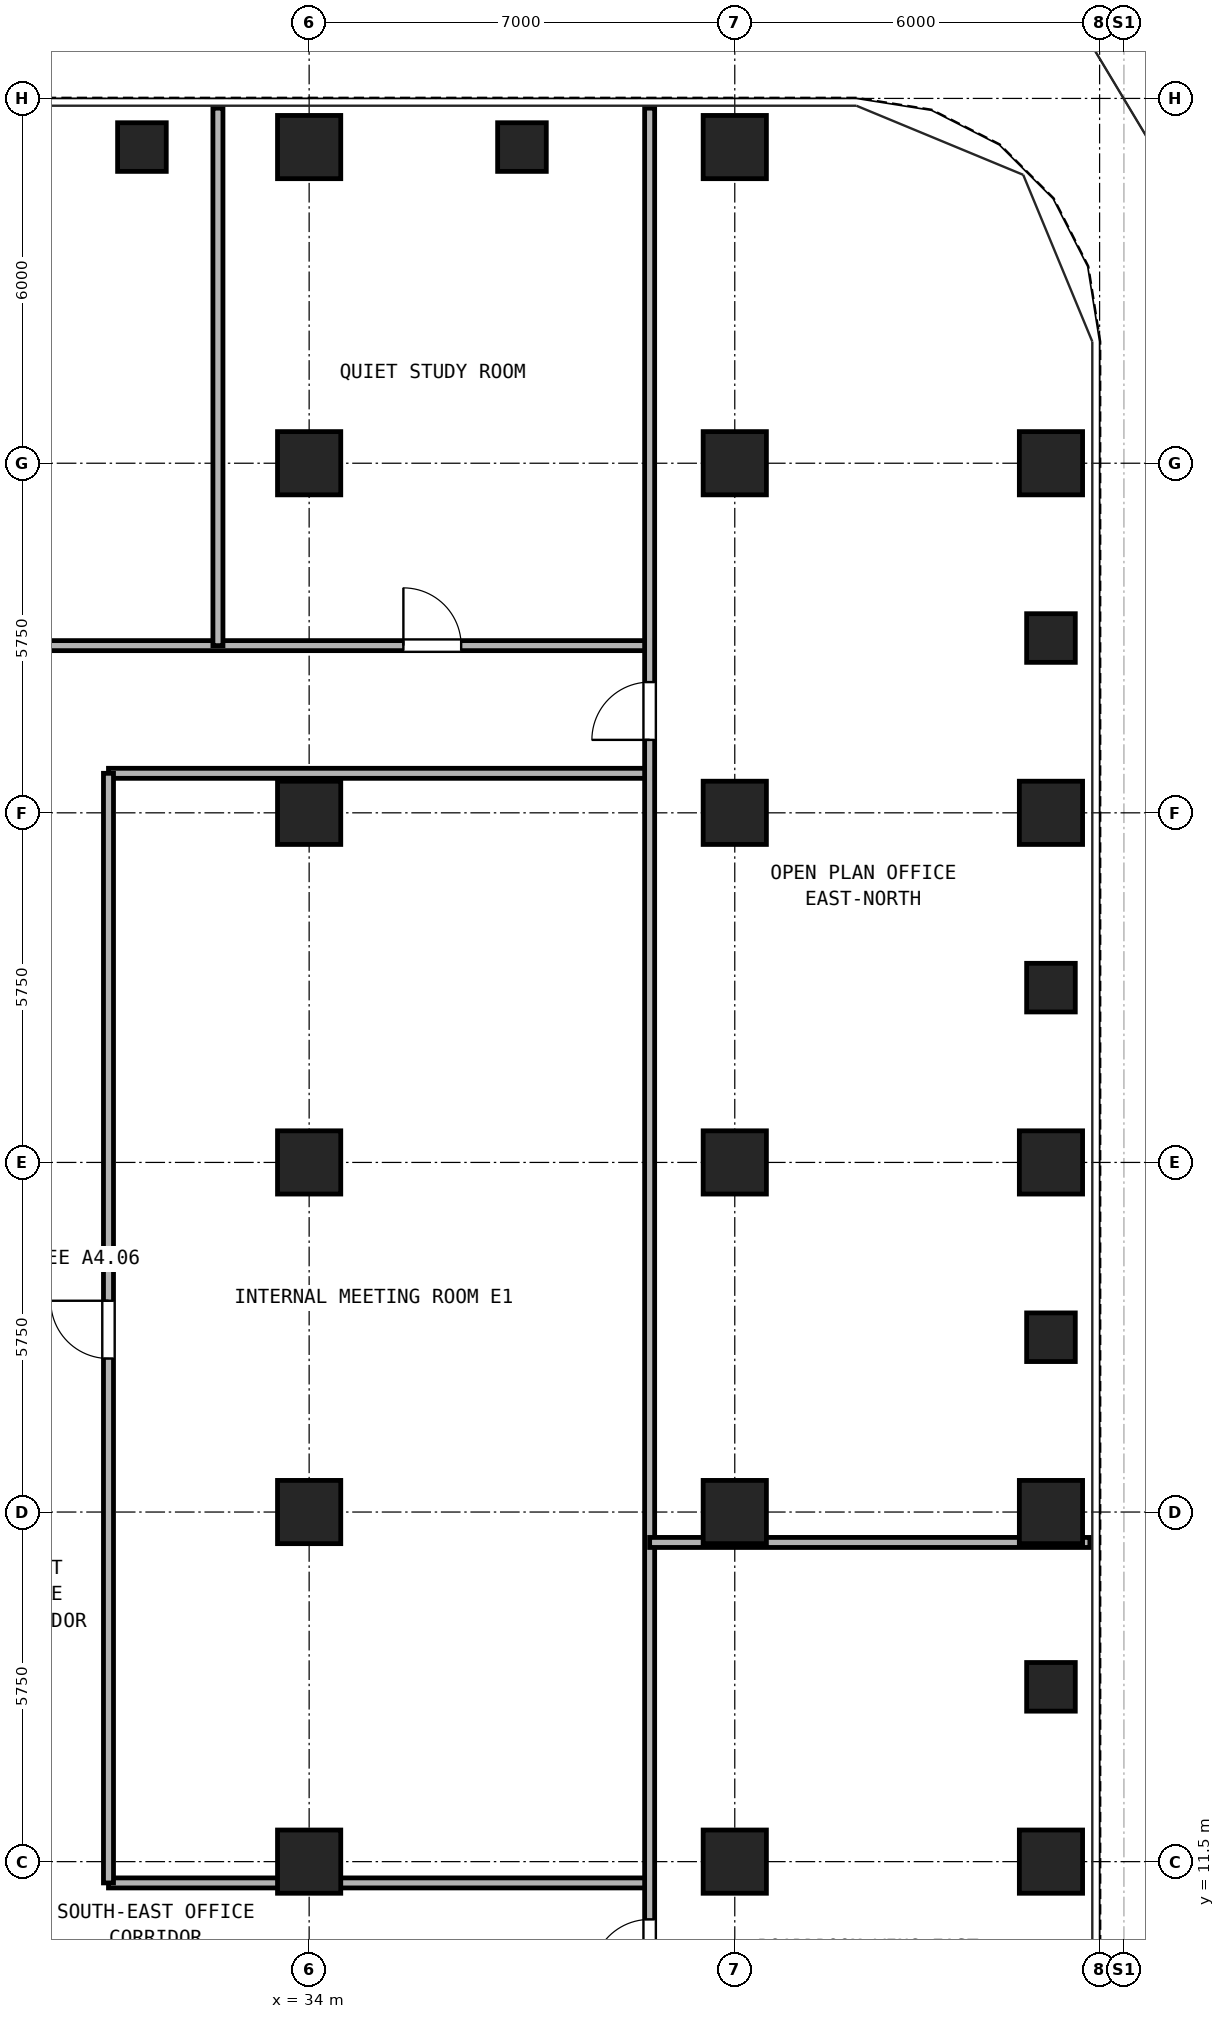
"""IFC4 building model, lengths in metres.
Left out: names, types, materials, properties, quantities, classifications, styles, units other than length and angle.
Written with IfcOpenShell. Run it as: python <this file> out.ifc"""

import sys

from ifc_helpers import new_model, si_unit, direction, frame, frame_2d, origin, origin_2d, place, context, subcontext, project, spatial, rectangle, hollow_rectangle, extrude, source, transform, mapped, element, fill, save


model = new_model("IFC4")
c1 = context("Model", 3, precision=1e-05, world=origin(), true_north=direction((0.0, 1.0)))
c2 = subcontext(c1, "Body", "Model", "MODEL_VIEW")
j1 = project(units=[si_unit("LENGTHUNIT", "METRE"), si_unit("PLANEANGLEUNIT", "RADIAN")], contexts=[c1])
p1 = place(None, origin())
s1 = spatial("IfcSite", under=j1, at=p1, CompositionType="ELEMENT")
p2 = place(p1, origin())
s2 = spatial("IfcBuilding", under=s1, at=p2, CompositionType="ELEMENT")
p3 = place(p2, frame((0.0, 0.0, 36.9)))
s3 = spatial("IfcBuildingStorey", under=s2, at=p3, CompositionType="ELEMENT", Elevation=36.9)
m1 = source(origin(), c2, "Body", "SweptSolid", [
    extrude(hollow_rectangle(XDim=1.04, YDim=1.04, WallThickness=0.065, at=origin_2d()), origin(), (0.0, 0.0, 1.0), 3.32),
])
for number, where, z_axis, x_axis in (
    (1, (34.0, 39.7, 0.0), (0.0, 0.0, 1.0), (1.0, 0.0, 0.0)),
    (2, (41.0, 39.7, 0.0), (0.0, 0.0, 1.0), (1.0, 0.0, 0.0)),
    (3, (46.2, 11.5, 0.0), (0.0, 0.0, 1.0), (1.0, 0.0, 0.0)),
    (4, (46.2, 17.25, 0.0), (0.0, 0.0, 1.0), (1.0, 0.0, 0.0)),
    (5, (46.2, 23.0, 0.0), (0.0, 0.0, 1.0), (1.0, 0.0, 0.0)),
    (6, (46.2, 28.75, 0.0), (0.0, 0.0, 1.0), (1.0, 0.0, 0.0)),
    (7, (46.2, 34.5, 0.0), (0.0, 0.0, 1.0), (1.0, 0.0, 0.0)),
    (8, (34.0, 11.5, 0.0), (0.0, 0.0, 1.0), (1.0, 0.0, 0.0)),
    (9, (34.0, 17.25, 0.0), (0.0, 0.0, 1.0), (1.0, 0.0, 0.0)),
    (10, (34.0, 23.0, 0.0), (0.0, 0.0, 1.0), (1.0, 0.0, 0.0)),
    (11, (34.0, 28.75, 0.0), (0.0, 0.0, 1.0), (1.0, 0.0, 0.0)),
    (12, (34.0, 34.5, 0.0), (0.0, 0.0, 1.0), (1.0, 0.0, 0.0)),
    (13, (41.0, 11.5, 0.0), (0.0, 0.0, 1.0), (1.0, 0.0, 0.0)),
    (14, (41.0, 17.25, 0.0), (0.0, 0.0, 1.0), (1.0, 0.0, 0.0)),
    (15, (41.0, 23.0, 0.0), (0.0, 0.0, 1.0), (1.0, 0.0, 0.0)),
    (16, (41.0, 28.75, 0.0), (0.0, 0.0, 1.0), (1.0, 0.0, 0.0)),
    (17, (41.0, 34.5, 0.0), (0.0, 0.0, 1.0), (1.0, 0.0, 0.0)),
):
    element("IfcColumn", number, at=place(p3, frame(where, z_axis=z_axis, x_axis=x_axis)), inside=s3, PredefinedType="COLUMN", context=c2, shape_type="MappedRepresentation", body=[
        mapped(m1, transform((0.0, 0.0, 0.0), x_axis=(1.0, 0.0, 0.0), y_axis=(0.0, 1.0, 0.0), z_axis=(0.0, 0.0, 1.0), scale=1.0)),
    ])
m2 = source(origin(), c2, "Body", "SweptSolid", [
    extrude(hollow_rectangle(XDim=0.8, YDim=0.8, WallThickness=0.045, at=origin_2d()), origin(), (0.0, 0.0, 1.0), 3.32),
])
for number, where, z_axis, x_axis in (
    (18, (31.25, 39.7, 0.0), (0.0, 0.0, 1.0), (1.0, 0.0, 0.0)),
    (19, (37.5, 39.7, 0.0), (0.0, 0.0, 1.0), (1.0, 0.0, 0.0)),
    (20, (46.2, 14.375, 0.0), (0.0, 0.0, 1.0), (1.0, 0.0, 0.0)),
    (21, (46.2, 20.125, 0.0), (0.0, 0.0, 1.0), (1.0, 0.0, 0.0)),
    (22, (46.2, 25.875, 0.0), (0.0, 0.0, 1.0), (1.0, 0.0, 0.0)),
    (23, (46.2, 31.625, 0.0), (0.0, 0.0, 1.0), (1.0, 0.0, 0.0)),
):
    element("IfcColumn", number, at=place(p3, frame(where, z_axis=z_axis, x_axis=x_axis)), inside=s3, PredefinedType="COLUMN", context=c2, shape_type="MappedRepresentation", body=[
        mapped(m2, transform((0.0, 0.0, 0.0), x_axis=(1.0, 0.0, 0.0), y_axis=(0.0, 1.0, 0.0), z_axis=(0.0, 0.0, 1.0), scale=1.0)),
    ])
p4 = place(p3, frame((7.4, 31.5, 0.0), z_axis=(0.0, 0.0, 1.0), x_axis=(1.0, 0.0, 0.0)))
e24 = element("IfcWall", 24, at=p4, inside=s3, PredefinedType="PARTITIONING", context=c2, shape_type="SweptSolid", body=[
    extrude(rectangle(XDim=32.2, YDim=0.165, at=frame_2d((16.1, 0.0))), origin(), (0.0, 0.0, 1.0), 2.898),
])
p5 = place(p4, frame((7.55, 0.0, 0.0)))
e25 = element("IfcOpeningElement", 25, at=p5, cuts=e24, PredefinedType="OPENING", context=c2, shape_type="SweptSolid", body=[
    extrude(rectangle(XDim=0.95, YDim=2.15, at=frame_2d((0.475, 1.075))), frame((0.0, 0.093, 0.0), z_axis=(0.0, -1.0, 0.0), x_axis=(1.0, 0.0, 0.0)), (0.0, 0.0, 1.0), 0.185),
])
p6 = place(p4, frame((20.1, 0.0, 0.0)))
e26 = element("IfcOpeningElement", 26, at=p6, cuts=e24, PredefinedType="OPENING", context=c2, shape_type="SweptSolid", body=[
    extrude(rectangle(XDim=0.95, YDim=2.15, at=frame_2d((0.475, 1.075))), frame((0.0, 0.093, 0.0), z_axis=(0.0, -1.0, 0.0), x_axis=(1.0, 0.0, 0.0)), (0.0, 0.0, 1.0), 0.185),
])
p7 = place(p4, frame((28.15, 0.0, 0.0)))
e27 = element("IfcOpeningElement", 27, at=p7, cuts=e24, PredefinedType="OPENING", context=c2, shape_type="SweptSolid", body=[
    extrude(rectangle(XDim=0.95, YDim=2.15, at=frame_2d((0.475, 1.075))), frame((0.0, 0.093, 0.0), z_axis=(0.0, -1.0, 0.0), x_axis=(1.0, 0.0, 0.0)), (0.0, 0.0, 1.0), 0.185),
])
for number, where, z_axis, x_axis in (
    (28, (30.7, 11.15, 0.0), (0.0, 0.0, 1.0), (1.0, 0.0, 0.0)),
    (29, (30.7, 29.4, 0.0), (0.0, 0.0, 1.0), (1.0, 0.0, 0.0)),
):
    element("IfcWall", number, at=place(p3, frame(where, z_axis=z_axis, x_axis=x_axis)), inside=s3, PredefinedType="PARTITIONING", context=c2, shape_type="SweptSolid", body=[
        extrude(rectangle(XDim=8.9, YDim=0.165, at=frame_2d((4.45, 0.0))), origin(), (0.0, 0.0, 1.0), 3.32),
    ])
p8 = place(p3, frame((30.7, 11.15, 0.0), z_axis=(0.0, 0.0, 1.0), x_axis=(0.0, 1.0, 0.0)))
e30 = element("IfcWall", 30, at=p8, inside=s3, PredefinedType="PARTITIONING", context=c2, shape_type="SweptSolid", body=[
    extrude(rectangle(XDim=18.25, YDim=0.165, at=frame_2d((9.125, 0.0))), origin(), (0.0, 0.0, 1.0), 3.32),
])
p9 = place(p8, frame((8.625, 0.0, 0.0)))
e31 = element("IfcOpeningElement", 31, at=p9, cuts=e30, PredefinedType="OPENING", context=c2, shape_type="SweptSolid", body=[
    extrude(rectangle(XDim=0.95, YDim=2.15, at=frame_2d((0.475, 1.075))), frame((0.0, 0.093, 0.0), z_axis=(0.0, -1.0, 0.0), x_axis=(1.0, 0.0, 0.0)), (0.0, 0.0, 1.0), 0.185),
])
p10 = place(p3, frame((39.6, 0.16, 0.0), z_axis=(0.0, 0.0, 1.0), x_axis=(0.0, 1.0, 0.0)))
e32 = element("IfcWall", 32, at=p10, inside=s3, PredefinedType="PARTITIONING", context=c2, shape_type="SweptSolid", body=[
    extrude(rectangle(XDim=40.18, YDim=0.165, at=frame_2d((20.09, 0.0))), origin(), (0.0, 0.0, 1.0), 3.32),
])
p11 = place(p10, frame((9.44, 0.0, 0.0)))
e33 = element("IfcOpeningElement", 33, at=p11, cuts=e32, PredefinedType="OPENING", context=c2, shape_type="SweptSolid", body=[
    extrude(rectangle(XDim=0.95, YDim=2.15, at=frame_2d((0.475, 1.075))), frame((0.0, 0.093, 0.0), z_axis=(0.0, -1.0, 0.0), x_axis=(1.0, 0.0, 0.0)), (0.0, 0.0, 1.0), 0.185),
])
p12 = place(p10, frame((29.79, 0.0, 0.0)))
e34 = element("IfcOpeningElement", 34, at=p12, cuts=e32, PredefinedType="OPENING", context=c2, shape_type="SweptSolid", body=[
    extrude(rectangle(XDim=0.95, YDim=2.15, at=frame_2d((0.475, 1.075))), frame((0.0, 0.093, 0.0), z_axis=(0.0, -1.0, 0.0), x_axis=(1.0, 0.0, 0.0)), (0.0, 0.0, 1.0), 0.185),
])
p13 = place(p3, frame((32.5, 31.5, 0.0), z_axis=(0.0, 0.0, 1.0), x_axis=(0.0, 1.0, 0.0)))
e35 = element("IfcWall", 35, at=p13, inside=s3, PredefinedType="PARTITIONING", context=c2, shape_type="SweptSolid", body=[
    extrude(rectangle(XDim=8.84, YDim=0.165, at=frame_2d((4.42, 0.0))), origin(), (0.0, 0.0, 1.0), 3.32),
])
p14 = place(p3, frame((39.6, 16.75, 0.0), z_axis=(0.0, 0.0, 1.0), x_axis=(1.0, 0.0, 0.0)))
e36 = element("IfcWall", 36, at=p14, inside=s3, PredefinedType="PARTITIONING", context=c2, shape_type="SweptSolid", body=[
    extrude(rectangle(XDim=7.24, YDim=0.165, at=frame_2d((3.62, 0.0))), origin(), (0.0, 0.0, 1.0), 3.32),
])
p15 = place(p7, origin())
e37 = element("IfcDoor", 37, at=p15, inside=s3, OperationType="SINGLE_SWING_LEFT", PredefinedType="DOOR", context=c2, shape_type="SweptSolid", body=[
    extrude(rectangle(XDim=0.95, YDim=2.15, at=frame_2d((0.475, 1.075))), frame((0.0, 0.025, 0.0), z_axis=(0.0, -1.0, 0.0), x_axis=(1.0, 0.0, 0.0)), (0.0, 0.0, 1.0), 0.05),
])
fill(e27, e37)
p16 = place(p11, origin())
e38 = element("IfcDoor", 38, at=p16, inside=s3, OperationType="SINGLE_SWING_LEFT", PredefinedType="DOOR", context=c2, shape_type="SweptSolid", body=[
    extrude(rectangle(XDim=0.95, YDim=2.15, at=frame_2d((0.475, 1.075))), frame((0.0, 0.025, 0.0), z_axis=(0.0, -1.0, 0.0), x_axis=(1.0, 0.0, 0.0)), (0.0, 0.0, 1.0), 0.05),
])
fill(e33, e38)
p17 = place(p12, origin())
e39 = element("IfcDoor", 39, at=p17, inside=s3, OperationType="SINGLE_SWING_LEFT", PredefinedType="DOOR", context=c2, shape_type="SweptSolid", body=[
    extrude(rectangle(XDim=0.95, YDim=2.15, at=frame_2d((0.475, 1.075))), frame((0.0, 0.025, 0.0), z_axis=(0.0, -1.0, 0.0), x_axis=(1.0, 0.0, 0.0)), (0.0, 0.0, 1.0), 0.05),
])
fill(e34, e39)
p18 = place(p9, origin())
e40 = element("IfcDoor", 40, at=p18, inside=s3, OperationType="SINGLE_SWING_RIGHT", PredefinedType="DOOR", context=c2, shape_type="SweptSolid", body=[
    extrude(rectangle(XDim=0.95, YDim=2.15, at=frame_2d((0.475, 1.075))), frame((0.0, 0.025, 0.0), z_axis=(0.0, -1.0, 0.0), x_axis=(1.0, 0.0, 0.0)), (0.0, 0.0, 1.0), 0.05),
])
fill(e31, e40)
save(model, sys.argv[1])
